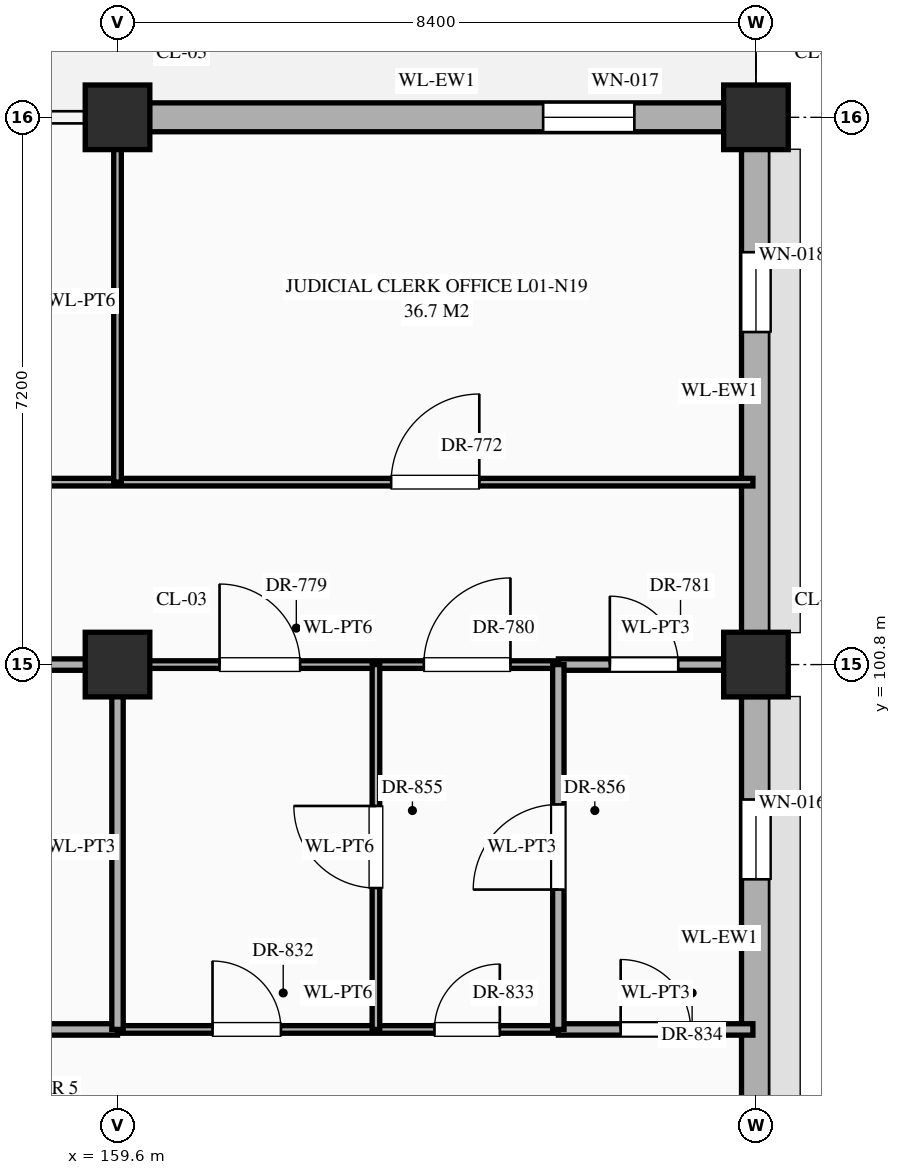
"""IFC4 building model, lengths in metres.
Left out: names, types, materials, properties, quantities, classifications, styles, units other than length and angle.
Written with IfcOpenShell. Run it as: python <this file> out.ifc"""

import sys

from ifc_helpers import new_model, si_unit, direction, frame, frame_2d, origin, origin_2d, place, context, subcontext, project, spatial, rectangle, extrude, element, fill, save


model = new_model("IFC4")
c1 = context("Model", 3, precision=1e-05, world=origin(), true_north=direction((0.0, 1.0)))
c2 = subcontext(c1, "Body", "Model", "MODEL_VIEW")
j1 = project(units=[si_unit("LENGTHUNIT", "METRE"), si_unit("PLANEANGLEUNIT", "RADIAN")], contexts=[c1])
p1 = place(None, origin())
s1 = spatial("IfcSite", under=j1, at=p1, CompositionType="ELEMENT")
p2 = place(p1, origin())
s2 = spatial("IfcBuilding", under=s1, at=p2, CompositionType="ELEMENT")
p3 = place(p2, origin())
s3 = spatial("IfcBuildingStorey", under=s2, at=p3, CompositionType="ELEMENT", Elevation=0.0)
for number, where, z_axis, x_axis in (
    (1, (159.6, 100.8, 0.0), (0.0, 0.0, 1.0), (1.0, 0.0, 0.0)),
    (2, (159.6, 108.0, 0.0), (0.0, 0.0, 1.0), (1.0, 0.0, 0.0)),
    (3, (168.0, 100.8, 0.0), (0.0, 0.0, 1.0), (1.0, 0.0, 0.0)),
    (4, (168.0, 108.0, 0.0), (0.0, 0.0, 1.0), (1.0, 0.0, 0.0)),
):
    element("IfcColumn", number, at=place(p3, frame(where, z_axis=z_axis, x_axis=x_axis)), inside=s3, PredefinedType="COLUMN", context=c2, shape_type="SweptSolid", body=[
        extrude(rectangle(XDim=0.85, YDim=0.85, at=origin_2d()), origin(), (0.0, 0.0, 1.0), 5.4),
    ])
p4 = place(p3, frame((168.0, 94.02, 0.0), z_axis=(0.0, 0.0, 1.0), x_axis=(0.0, 1.0, 0.0)))
e5 = element("IfcWall", 5, at=p4, inside=s3, PredefinedType="STANDARD", context=c2, shape_type="SweptSolid", body=[
    extrude(rectangle(XDim=6.36, YDim=0.38, at=frame_2d((3.18, 0.0))), origin(), (0.0, 0.0, 1.0), 4.47),
])
p5 = place(p4, frame((3.955, 0.0, 0.85)))
e6 = element("IfcOpeningElement", 6, at=p5, cuts=e5, PredefinedType="OPENING", context=c2, shape_type="SweptSolid", body=[
    extrude(rectangle(XDim=1.05, YDim=1.56, at=frame_2d((0.525, 0.78))), frame((0.0, 0.202, 0.0), z_axis=(0.0, -1.0, 0.0), x_axis=(1.0, 0.0, 0.0)), (0.0, 0.0, 1.0), 0.404),
])
p6 = place(p3, frame((160.02, 108.0, 0.0), z_axis=(0.0, 0.0, 1.0), x_axis=(1.0, 0.0, 0.0)))
e7 = element("IfcWall", 7, at=p6, inside=s3, PredefinedType="STANDARD", context=c2, shape_type="SweptSolid", body=[
    extrude(rectangle(XDim=7.56, YDim=0.38, at=frame_2d((3.78, 0.0))), origin(), (0.0, 0.0, 1.0), 4.47),
])
p7 = place(p6, frame((5.18, 0.0, 0.85)))
e8 = element("IfcOpeningElement", 8, at=p7, cuts=e7, PredefinedType="OPENING", context=c2, shape_type="SweptSolid", body=[
    extrude(rectangle(XDim=1.2, YDim=1.2, at=frame_2d((0.6, 0.6))), frame((0.0, 0.202, 0.0), z_axis=(0.0, -1.0, 0.0), x_axis=(1.0, 0.0, 0.0)), (0.0, 0.0, 1.0), 0.404),
])
p8 = place(p3, frame((168.0, 101.22, 0.0), z_axis=(0.0, 0.0, 1.0), x_axis=(0.0, 1.0, 0.0)))
e9 = element("IfcWall", 9, at=p8, inside=s3, PredefinedType="STANDARD", context=c2, shape_type="SweptSolid", body=[
    extrude(rectangle(XDim=6.36, YDim=0.38, at=frame_2d((3.18, 0.0))), origin(), (0.0, 0.0, 1.0), 4.47),
])
p9 = place(p8, frame((3.955, 0.0, 0.85)))
e10 = element("IfcOpeningElement", 10, at=p9, cuts=e9, PredefinedType="OPENING", context=c2, shape_type="SweptSolid", body=[
    extrude(rectangle(XDim=1.05, YDim=1.74, at=frame_2d((0.525, 0.87))), frame((0.0, 0.202, 0.0), z_axis=(0.0, -1.0, 0.0), x_axis=(1.0, 0.0, 0.0)), (0.0, 0.0, 1.0), 0.404),
])
p10 = place(p3, frame((140.2, 96.0, 0.0), z_axis=(0.0, 0.0, 1.0), x_axis=(1.0, 0.0, 0.0)))
e11 = element("IfcWall", 11, at=p10, inside=s3, PredefinedType="STANDARD", context=c2, shape_type="SweptSolid", body=[
    extrude(rectangle(XDim=19.4, YDim=0.15, at=frame_2d((9.7, 0.0))), origin(), (0.0, 0.0, 1.0), 5.12),
])
p11 = place(p10, frame((0.79, 0.0, 0.0)))
e12 = element("IfcOpeningElement", 12, at=p11, cuts=e11, PredefinedType="OPENING", context=c2, shape_type="SweptSolid", body=[
    extrude(rectangle(XDim=1.02, YDim=2.4, at=frame_2d((0.51, 1.2))), frame((0.0, 0.087, 0.0), z_axis=(0.0, -1.0, 0.0), x_axis=(1.0, 0.0, 0.0)), (0.0, 0.0, 1.0), 0.174),
])
p12 = place(p10, frame((6.27, 0.0, 0.0)))
e13 = element("IfcOpeningElement", 13, at=p12, cuts=e11, PredefinedType="OPENING", context=c2, shape_type="SweptSolid", body=[
    extrude(rectangle(XDim=1.06, YDim=2.4, at=frame_2d((0.53, 1.2))), frame((0.0, 0.087, 0.0), z_axis=(0.0, -1.0, 0.0), x_axis=(1.0, 0.0, 0.0)), (0.0, 0.0, 1.0), 0.174),
])
p13 = place(p10, frame((14.63, 0.0, 0.0)))
e14 = element("IfcOpeningElement", 14, at=p13, cuts=e11, PredefinedType="OPENING", context=c2, shape_type="SweptSolid", body=[
    extrude(rectangle(XDim=1.14, YDim=2.4, at=frame_2d((0.57, 1.2))), frame((0.0, 0.087, 0.0), z_axis=(0.0, -1.0, 0.0), x_axis=(1.0, 0.0, 0.0)), (0.0, 0.0, 1.0), 0.174),
])
p14 = place(p3, frame((159.6, 96.0, 0.0), z_axis=(0.0, 0.0, 1.0), x_axis=(1.0, 0.0, 0.0)))
e15 = element("IfcWall", 15, at=p14, inside=s3, PredefinedType="STANDARD", context=c2, shape_type="SweptSolid", body=[
    extrude(rectangle(XDim=5.8, YDim=0.1, at=frame_2d((2.9, 0.0))), origin(), (0.0, 0.0, 1.0), 5.12),
])
p15 = place(p14, frame((1.25, 0.0, 0.0)))
e16 = element("IfcOpeningElement", 16, at=p15, cuts=e15, PredefinedType="OPENING", context=c2, shape_type="SweptSolid", body=[
    extrude(rectangle(XDim=0.9, YDim=2.15, at=frame_2d((0.45, 1.075))), frame((0.0, 0.062, 0.0), z_axis=(0.0, -1.0, 0.0), x_axis=(1.0, 0.0, 0.0)), (0.0, 0.0, 1.0), 0.124),
])
p16 = place(p14, frame((4.17, 0.0, 0.0)))
e17 = element("IfcOpeningElement", 17, at=p16, cuts=e15, PredefinedType="OPENING", context=c2, shape_type="SweptSolid", body=[
    extrude(rectangle(XDim=0.86, YDim=2.1, at=frame_2d((0.43, 1.05))), frame((0.0, 0.062, 0.0), z_axis=(0.0, -1.0, 0.0), x_axis=(1.0, 0.0, 0.0)), (0.0, 0.0, 1.0), 0.124),
])
p17 = place(p3, frame((165.4, 96.0, 0.0), z_axis=(0.0, 0.0, 1.0), x_axis=(1.0, 0.0, 0.0)))
e18 = element("IfcWall", 18, at=p17, inside=s3, PredefinedType="STANDARD", context=c2, shape_type="SweptSolid", body=[
    extrude(rectangle(XDim=2.56, YDim=0.15, at=frame_2d((1.28, 0.0))), origin(), (0.0, 0.0, 1.0), 5.12),
])
p18 = place(p17, frame((0.82, 0.0, 0.0)))
e19 = element("IfcOpeningElement", 19, at=p18, cuts=e18, PredefinedType="OPENING", context=c2, shape_type="SweptSolid", body=[
    extrude(rectangle(XDim=0.92, YDim=2.15, at=frame_2d((0.46, 1.075))), frame((0.0, 0.087, 0.0), z_axis=(0.0, -1.0, 0.0), x_axis=(1.0, 0.0, 0.0)), (0.0, 0.0, 1.0), 0.174),
])
p19 = place(p3, frame((140.2, 100.8, 0.0), z_axis=(0.0, 0.0, 1.0), x_axis=(1.0, 0.0, 0.0)))
e20 = element("IfcWall", 20, at=p19, inside=s3, PredefinedType="STANDARD", context=c2, shape_type="SweptSolid", body=[
    extrude(rectangle(XDim=19.4, YDim=0.15, at=frame_2d((9.7, 0.0))), origin(), (0.0, 0.0, 1.0), 4.27),
])
p20 = place(p19, frame((0.657, 0.0, 0.0)))
e21 = element("IfcOpeningElement", 21, at=p20, cuts=e20, PredefinedType="OPENING", context=c2, shape_type="SweptSolid", body=[
    extrude(rectangle(XDim=0.94, YDim=2.3, at=frame_2d((0.47, 1.15))), frame((0.0, 0.087, 0.0), z_axis=(0.0, -1.0, 0.0), x_axis=(1.0, 0.0, 0.0)), (0.0, 0.0, 1.0), 0.174),
])
p21 = place(p19, frame((6.31, 0.0, 0.0)))
e22 = element("IfcOpeningElement", 22, at=p21, cuts=e20, PredefinedType="OPENING", context=c2, shape_type="SweptSolid", body=[
    extrude(rectangle(XDim=0.98, YDim=2.35, at=frame_2d((0.49, 1.175))), frame((0.0, 0.087, 0.0), z_axis=(0.0, -1.0, 0.0), x_axis=(1.0, 0.0, 0.0)), (0.0, 0.0, 1.0), 0.174),
])
p22 = place(p19, frame((14.69, 0.0, 0.0)))
e23 = element("IfcOpeningElement", 23, at=p22, cuts=e20, PredefinedType="OPENING", context=c2, shape_type="SweptSolid", body=[
    extrude(rectangle(XDim=1.02, YDim=2.4, at=frame_2d((0.51, 1.2))), frame((0.0, 0.087, 0.0), z_axis=(0.0, -1.0, 0.0), x_axis=(1.0, 0.0, 0.0)), (0.0, 0.0, 1.0), 0.174),
])
p23 = place(p3, frame((159.6, 100.8, 0.0), z_axis=(0.0, 0.0, 1.0), x_axis=(1.0, 0.0, 0.0)))
e24 = element("IfcWall", 24, at=p23, inside=s3, PredefinedType="STANDARD", context=c2, shape_type="SweptSolid", body=[
    extrude(rectangle(XDim=5.8, YDim=0.1, at=frame_2d((2.9, 0.0))), origin(), (0.0, 0.0, 1.0), 4.27),
])
p24 = place(p23, frame((1.343, 0.0, 0.0)))
e25 = element("IfcOpeningElement", 25, at=p24, cuts=e24, PredefinedType="OPENING", context=c2, shape_type="SweptSolid", body=[
    extrude(rectangle(XDim=1.06, YDim=2.4, at=frame_2d((0.53, 1.2))), frame((0.0, 0.062, 0.0), z_axis=(0.0, -1.0, 0.0), x_axis=(1.0, 0.0, 0.0)), (0.0, 0.0, 1.0), 0.124),
])
p25 = place(p23, frame((4.03, 0.0, 0.0)))
e26 = element("IfcOpeningElement", 26, at=p25, cuts=e24, PredefinedType="OPENING", context=c2, shape_type="SweptSolid", body=[
    extrude(rectangle(XDim=1.14, YDim=2.4, at=frame_2d((0.57, 1.2))), frame((0.0, 0.062, 0.0), z_axis=(0.0, -1.0, 0.0), x_axis=(1.0, 0.0, 0.0)), (0.0, 0.0, 1.0), 0.124),
])
p26 = place(p3, frame((165.4, 100.8, 0.0), z_axis=(0.0, 0.0, 1.0), x_axis=(1.0, 0.0, 0.0)))
e27 = element("IfcWall", 27, at=p26, inside=s3, PredefinedType="STANDARD", context=c2, shape_type="SweptSolid", body=[
    extrude(rectangle(XDim=2.56, YDim=0.15, at=frame_2d((1.28, 0.0))), origin(), (0.0, 0.0, 1.0), 4.27),
])
p27 = place(p26, frame((0.677, 0.0, 0.0)))
e28 = element("IfcOpeningElement", 28, at=p27, cuts=e27, PredefinedType="OPENING", context=c2, shape_type="SweptSolid", body=[
    extrude(rectangle(XDim=0.9, YDim=2.15, at=frame_2d((0.45, 1.075))), frame((0.0, 0.087, 0.0), z_axis=(0.0, -1.0, 0.0), x_axis=(1.0, 0.0, 0.0)), (0.0, 0.0, 1.0), 0.174),
])
p28 = place(p3, frame((126.0, 103.2, 0.0), z_axis=(0.0, 0.0, 1.0), x_axis=(1.0, 0.0, 0.0)))
e29 = element("IfcWall", 29, at=p28, inside=s3, PredefinedType="STANDARD", context=c2, shape_type="SweptSolid", body=[
    extrude(rectangle(XDim=41.96, YDim=0.1, at=frame_2d((20.98, 0.0))), origin(), (0.0, 0.0, 1.0), 5.12),
])
p29 = place(p28, frame((3.7, 0.0, 0.0)))
e30 = element("IfcOpeningElement", 30, at=p29, cuts=e29, PredefinedType="OPENING", context=c2, shape_type="SweptSolid", body=[
    extrude(rectangle(XDim=1.0, YDim=2.25, at=frame_2d((0.5, 1.125))), frame((0.0, 0.062, 0.0), z_axis=(0.0, -1.0, 0.0), x_axis=(1.0, 0.0, 0.0)), (0.0, 0.0, 1.0), 0.124),
])
p30 = place(p28, frame((12.08, 0.0, 0.0)))
e31 = element("IfcOpeningElement", 31, at=p30, cuts=e29, PredefinedType="OPENING", context=c2, shape_type="SweptSolid", body=[
    extrude(rectangle(XDim=1.04, YDim=2.2, at=frame_2d((0.52, 1.1))), frame((0.0, 0.062, 0.0), z_axis=(0.0, -1.0, 0.0), x_axis=(1.0, 0.0, 0.0)), (0.0, 0.0, 1.0), 0.124),
])
p31 = place(p28, frame((20.46, 0.0, 0.0)))
e32 = element("IfcOpeningElement", 32, at=p31, cuts=e29, PredefinedType="OPENING", context=c2, shape_type="SweptSolid", body=[
    extrude(rectangle(XDim=1.08, YDim=2.25, at=frame_2d((0.54, 1.125))), frame((0.0, 0.062, 0.0), z_axis=(0.0, -1.0, 0.0), x_axis=(1.0, 0.0, 0.0)), (0.0, 0.0, 1.0), 0.124),
])
p32 = place(p28, frame((28.84, 0.0, 0.0)))
e33 = element("IfcOpeningElement", 33, at=p32, cuts=e29, PredefinedType="OPENING", context=c2, shape_type="SweptSolid", body=[
    extrude(rectangle(XDim=1.12, YDim=2.25, at=frame_2d((0.56, 1.125))), frame((0.0, 0.062, 0.0), z_axis=(0.0, -1.0, 0.0), x_axis=(1.0, 0.0, 0.0)), (0.0, 0.0, 1.0), 0.124),
])
p33 = place(p28, frame((37.2, 0.0, 0.0)))
e34 = element("IfcOpeningElement", 34, at=p33, cuts=e29, PredefinedType="OPENING", context=c2, shape_type="SweptSolid", body=[
    extrude(rectangle(XDim=1.16, YDim=2.3, at=frame_2d((0.58, 1.15))), frame((0.0, 0.062, 0.0), z_axis=(0.0, -1.0, 0.0), x_axis=(1.0, 0.0, 0.0)), (0.0, 0.0, 1.0), 0.124),
])
p34 = place(p3, frame((159.6, 96.0, 0.0), z_axis=(0.0, 0.0, 1.0), x_axis=(0.0, 1.0, 0.0)))
e35 = element("IfcWall", 35, at=p34, inside=s3, PredefinedType="STANDARD", context=c2, shape_type="SweptSolid", body=[
    extrude(rectangle(XDim=4.8, YDim=0.15, at=frame_2d((2.4, 0.0))), origin(), (0.0, 0.0, 1.0), 4.37),
])
p35 = place(p3, frame((159.6, 103.2, 0.0), z_axis=(0.0, 0.0, 1.0), x_axis=(0.0, 1.0, 0.0)))
e36 = element("IfcWall", 36, at=p35, inside=s3, PredefinedType="STANDARD", context=c2, shape_type="SweptSolid", body=[
    extrude(rectangle(XDim=4.76, YDim=0.1, at=frame_2d((2.38, 0.0))), origin(), (0.0, 0.0, 1.0), 4.37),
])
p36 = place(p3, frame((163.0, 96.0, 0.0), z_axis=(0.0, 0.0, 1.0), x_axis=(0.0, 1.0, 0.0)))
e37 = element("IfcWall", 37, at=p36, inside=s3, PredefinedType="STANDARD", context=c2, shape_type="SweptSolid", body=[
    extrude(rectangle(XDim=4.8, YDim=0.1, at=frame_2d((2.4, 0.0))), origin(), (0.0, 0.0, 1.0), 5.12),
])
p37 = place(p36, frame((1.86, 0.0, 0.0)))
e38 = element("IfcOpeningElement", 38, at=p37, cuts=e37, PredefinedType="OPENING", context=c2, shape_type="SweptSolid", body=[
    extrude(rectangle(XDim=1.08, YDim=2.25, at=frame_2d((0.54, 1.125))), frame((0.0, 0.062, 0.0), z_axis=(0.0, -1.0, 0.0), x_axis=(1.0, 0.0, 0.0)), (0.0, 0.0, 1.0), 0.124),
])
p38 = place(p3, frame((165.4, 96.0, 0.0), z_axis=(0.0, 0.0, 1.0), x_axis=(0.0, 1.0, 0.0)))
e39 = element("IfcWall", 39, at=p38, inside=s3, PredefinedType="STANDARD", context=c2, shape_type="SweptSolid", body=[
    extrude(rectangle(XDim=4.8, YDim=0.15, at=frame_2d((2.4, 0.0))), origin(), (0.0, 0.0, 1.0), 5.12),
])
p39 = place(p38, frame((1.84, 0.0, 0.0)))
e40 = element("IfcOpeningElement", 40, at=p39, cuts=e39, PredefinedType="OPENING", context=c2, shape_type="SweptSolid", body=[
    extrude(rectangle(XDim=1.12, YDim=2.25, at=frame_2d((0.56, 1.125))), frame((0.0, 0.087, 0.0), z_axis=(0.0, -1.0, 0.0), x_axis=(1.0, 0.0, 0.0)), (0.0, 0.0, 1.0), 0.174),
])
p40 = place(p5, origin())
e41 = element("IfcWindow", 41, at=p40, inside=s3, PartitioningType="SINGLE_PANEL", PredefinedType="WINDOW", context=c2, shape_type="SweptSolid", body=[
    extrude(rectangle(XDim=1.05, YDim=1.56, at=frame_2d((0.525, 0.78))), frame((0.0, 0.03, 0.0), z_axis=(0.0, -1.0, 0.0), x_axis=(1.0, 0.0, 0.0)), (0.0, 0.0, 1.0), 0.06),
])
fill(e6, e41)
p41 = place(p7, origin())
e42 = element("IfcWindow", 42, at=p41, inside=s3, PartitioningType="SINGLE_PANEL", PredefinedType="WINDOW", context=c2, shape_type="SweptSolid", body=[
    extrude(rectangle(XDim=1.2, YDim=1.2, at=frame_2d((0.6, 0.6))), frame((0.0, 0.03, 0.0), z_axis=(0.0, -1.0, 0.0), x_axis=(1.0, 0.0, 0.0)), (0.0, 0.0, 1.0), 0.06),
])
fill(e8, e42)
p42 = place(p9, origin())
e43 = element("IfcWindow", 43, at=p42, inside=s3, PartitioningType="SINGLE_PANEL", PredefinedType="WINDOW", context=c2, shape_type="SweptSolid", body=[
    extrude(rectangle(XDim=1.05, YDim=1.74, at=frame_2d((0.525, 0.87))), frame((0.0, 0.03, 0.0), z_axis=(0.0, -1.0, 0.0), x_axis=(1.0, 0.0, 0.0)), (0.0, 0.0, 1.0), 0.06),
])
fill(e10, e43)
p43 = place(p33, origin())
e44 = element("IfcDoor", 44, at=p43, inside=s3, OperationType="SINGLE_SWING_RIGHT", PredefinedType="DOOR", context=c2, shape_type="SweptSolid", body=[
    extrude(rectangle(XDim=1.16, YDim=2.3, at=frame_2d((0.58, 1.15))), frame((0.0, 0.025, 0.0), z_axis=(0.0, -1.0, 0.0), x_axis=(1.0, 0.0, 0.0)), (0.0, 0.0, 1.0), 0.05),
])
fill(e34, e44)
p44 = place(p24, origin())
e45 = element("IfcDoor", 45, at=p44, inside=s3, OperationType="SINGLE_SWING_LEFT", PredefinedType="DOOR", context=c2, shape_type="SweptSolid", body=[
    extrude(rectangle(XDim=1.06, YDim=2.4, at=frame_2d((0.53, 1.2))), frame((0.0, 0.025, 0.0), z_axis=(0.0, -1.0, 0.0), x_axis=(1.0, 0.0, 0.0)), (0.0, 0.0, 1.0), 0.05),
])
fill(e25, e45)
p45 = place(p25, origin())
e46 = element("IfcDoor", 46, at=p45, inside=s3, OperationType="SINGLE_SWING_RIGHT", PredefinedType="DOOR", context=c2, shape_type="SweptSolid", body=[
    extrude(rectangle(XDim=1.14, YDim=2.4, at=frame_2d((0.57, 1.2))), frame((0.0, 0.025, 0.0), z_axis=(0.0, -1.0, 0.0), x_axis=(1.0, 0.0, 0.0)), (0.0, 0.0, 1.0), 0.05),
])
fill(e26, e46)
p46 = place(p27, origin())
e47 = element("IfcDoor", 47, at=p46, inside=s3, OperationType="SINGLE_SWING_LEFT", PredefinedType="DOOR", context=c2, shape_type="SweptSolid", body=[
    extrude(rectangle(XDim=0.9, YDim=2.15, at=frame_2d((0.45, 1.075))), frame((0.0, 0.025, 0.0), z_axis=(0.0, -1.0, 0.0), x_axis=(1.0, 0.0, 0.0)), (0.0, 0.0, 1.0), 0.05),
])
fill(e28, e47)
p47 = place(p15, origin())
e48 = element("IfcDoor", 48, at=p47, inside=s3, OperationType="SINGLE_SWING_LEFT", PredefinedType="DOOR", context=c2, shape_type="SweptSolid", body=[
    extrude(rectangle(XDim=0.9, YDim=2.15, at=frame_2d((0.45, 1.075))), frame((0.0, 0.025, 0.0), z_axis=(0.0, -1.0, 0.0), x_axis=(1.0, 0.0, 0.0)), (0.0, 0.0, 1.0), 0.05),
])
fill(e16, e48)
p48 = place(p16, origin())
e49 = element("IfcDoor", 49, at=p48, inside=s3, OperationType="SINGLE_SWING_RIGHT", PredefinedType="DOOR", context=c2, shape_type="SweptSolid", body=[
    extrude(rectangle(XDim=0.86, YDim=2.1, at=frame_2d((0.43, 1.05))), frame((0.0, 0.025, 0.0), z_axis=(0.0, -1.0, 0.0), x_axis=(1.0, 0.0, 0.0)), (0.0, 0.0, 1.0), 0.05),
])
fill(e17, e49)
p49 = place(p18, origin())
e50 = element("IfcDoor", 50, at=p49, inside=s3, OperationType="SINGLE_SWING_LEFT", PredefinedType="DOOR", context=c2, shape_type="SweptSolid", body=[
    extrude(rectangle(XDim=0.92, YDim=2.15, at=frame_2d((0.46, 1.075))), frame((0.0, 0.025, 0.0), z_axis=(0.0, -1.0, 0.0), x_axis=(1.0, 0.0, 0.0)), (0.0, 0.0, 1.0), 0.05),
])
fill(e19, e50)
p50 = place(p37, origin())
e51 = element("IfcDoor", 51, at=p50, inside=s3, OperationType="SINGLE_SWING_RIGHT", PredefinedType="DOOR", context=c2, shape_type="SweptSolid", body=[
    extrude(rectangle(XDim=1.08, YDim=2.25, at=frame_2d((0.54, 1.125))), frame((0.0, 0.025, 0.0), z_axis=(0.0, -1.0, 0.0), x_axis=(1.0, 0.0, 0.0)), (0.0, 0.0, 1.0), 0.05),
])
fill(e38, e51)
p51 = place(p39, origin())
e52 = element("IfcDoor", 52, at=p51, inside=s3, OperationType="SINGLE_SWING_LEFT", PredefinedType="DOOR", context=c2, shape_type="SweptSolid", body=[
    extrude(rectangle(XDim=1.12, YDim=2.25, at=frame_2d((0.56, 1.125))), frame((0.0, 0.025, 0.0), z_axis=(0.0, -1.0, 0.0), x_axis=(1.0, 0.0, 0.0)), (0.0, 0.0, 1.0), 0.05),
])
fill(e40, e52)
save(model, sys.argv[1])
